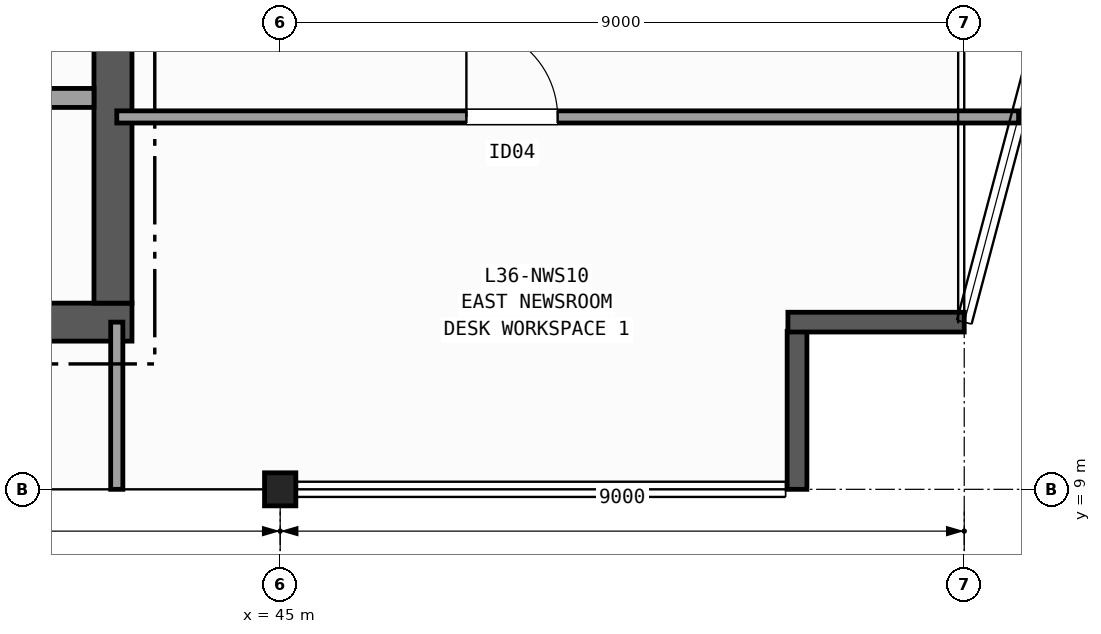
"""IFC4 building model, lengths in metres.
Left out: names, types, materials, properties, quantities, classifications, styles, units other than length and angle.
Written with IfcOpenShell. Run it as: python <this file> out.ifc"""

import sys

from ifc_helpers import new_model, si_unit, direction, frame, frame_2d, origin, origin_2d, place, context, subcontext, project, spatial, rectangle, i_section, extrude, element, fill, save


model = new_model("IFC4")
c1 = context("Model", 3, precision=1e-05, world=origin(), true_north=direction((0.0, 1.0)))
c2 = subcontext(c1, "Body", "Model", "MODEL_VIEW")
j1 = project(units=[si_unit("LENGTHUNIT", "METRE"), si_unit("PLANEANGLEUNIT", "RADIAN")], contexts=[c1])
p1 = place(None, origin())
s1 = spatial("IfcSite", under=j1, at=p1, CompositionType="ELEMENT")
p2 = place(p1, origin())
s2 = spatial("IfcBuilding", under=s1, at=p2, CompositionType="ELEMENT")
p3 = place(p2, frame((0.0, 0.0, 147.0)))
s3 = spatial("IfcBuildingStorey", under=s2, at=p3, CompositionType="ELEMENT", Elevation=147.0)
p4 = place(p3, frame((45.0, 9.0, 0.0), z_axis=(0.0, 0.0, 1.0), x_axis=(1.0, 0.0, 0.0)))
e1 = element("IfcColumn", 1, at=p4, inside=s3, PredefinedType="COLUMN", context=c2, shape_type="SweptSolid", body=[
    extrude(i_section(OverallWidth=0.412, OverallDepth=0.435, WebThickness=0.036, FlangeThickness=0.057, FilletRadius=0.015, at=origin_2d()), origin(), (0.0, 0.0, 1.0), 3.7),
])
p5 = place(p3, frame((51.8, 9.0, 0.0), z_axis=(0.0, 0.0, 1.0), x_axis=(0.0, 1.0, 0.0)))
e2 = element("IfcWall", 2, at=p5, inside=s3, PredefinedType="SOLIDWALL", context=c2, shape_type="SweptSolid", body=[
    extrude(rectangle(XDim=2.08, YDim=0.26, at=frame_2d((1.04, 0.0))), origin(), (0.0, 0.0, 1.0), 3.42),
])
p6 = place(p3, frame((51.68, 11.2, 0.0), z_axis=(0.0, 0.0, 1.0), x_axis=(1.0, 0.0, 0.0)))
e3 = element("IfcWall", 3, at=p6, inside=s3, PredefinedType="SOLIDWALL", context=c2, shape_type="SweptSolid", body=[
    extrude(rectangle(XDim=2.32, YDim=0.26, at=frame_2d((1.16, 0.0))), origin(), (0.0, 0.0, 1.0), 3.42),
])
p7 = place(p3, frame((29.15, 11.2, 0.0), z_axis=(0.0, 0.0, 1.0), x_axis=(1.0, 0.0, 0.0)))
e4 = element("IfcWall", 4, at=p7, inside=s3, PredefinedType="SHEAR", context=c2, shape_type="SweptSolid", body=[
    extrude(rectangle(XDim=13.9, YDim=0.5, at=frame_2d((6.95, 0.0))), origin(), (0.0, 0.0, 1.0), 3.42),
])
p8 = place(p3, frame((42.8, 11.45, 0.0), z_axis=(0.0, 0.0, 1.0), x_axis=(0.0, 1.0, 0.0)))
e5 = element("IfcWall", 5, at=p8, inside=s3, PredefinedType="SHEAR", context=c2, shape_type="SweptSolid", body=[
    extrude(rectangle(XDim=12.9, YDim=0.5, at=frame_2d((6.45, 0.0))), origin(), (0.0, 0.0, 1.0), 3.42),
])
p9 = place(p3, frame((38.2, 14.15, 0.0), z_axis=(0.0, 0.0, 1.0), x_axis=(1.0, 0.0, 0.0)))
e6 = element("IfcWall", 6, at=p9, inside=s3, PredefinedType="PARTITIONING", context=c2, shape_type="SweptSolid", body=[
    extrude(rectangle(XDim=4.35, YDim=0.25, at=frame_2d((2.175, 0.0))), origin(), (0.0, 0.0, 1.0), 3.42),
])
p10 = place(p9, frame((0.925, 0.0, 0.0)))
e7 = element("IfcOpeningElement", 7, at=p10, cuts=e6, PredefinedType="OPENING", context=c2, shape_type="SweptSolid", body=[
    extrude(rectangle(XDim=1.15, YDim=2.15, at=frame_2d((0.575, 1.075))), frame((0.0, 0.135, 0.0), z_axis=(0.0, -1.0, 0.0), x_axis=(1.0, 0.0, 0.0)), (0.0, 0.0, 1.0), 0.27),
])
p11 = place(p3, frame((42.85, 9.0, 0.0), z_axis=(0.0, 0.0, 1.0), x_axis=(0.0, 1.0, 0.0)))
e8 = element("IfcWall", 8, at=p11, inside=s3, PredefinedType="PARTITIONING", context=c2, shape_type="SweptSolid", body=[
    extrude(rectangle(XDim=2.2, YDim=0.16, at=frame_2d((1.1, 0.0))), origin(), (0.0, 0.0, 1.0), 2.634),
])
p12 = place(p3, frame((42.85, 13.9, 0.0), z_axis=(0.0, 0.0, 1.0), x_axis=(1.0, 0.0, 0.0)))
e9 = element("IfcWall", 9, at=p12, inside=s3, PredefinedType="PARTITIONING", context=c2, shape_type="SweptSolid", body=[
    extrude(rectangle(XDim=11.865, YDim=0.16, at=frame_2d((5.933, 0.0))), origin(), (0.0, 0.0, 1.0), 3.42),
])
p13 = place(p12, frame((4.6, 0.0, 0.0)))
e10 = element("IfcOpeningElement", 10, at=p13, cuts=e9, PredefinedType="OPENING", context=c2, shape_type="SweptSolid", body=[
    extrude(rectangle(XDim=1.2, YDim=2.15, at=frame_2d((0.6, 1.075))), frame((0.0, 0.09, 0.0), z_axis=(0.0, -1.0, 0.0), x_axis=(1.0, 0.0, 0.0)), (0.0, 0.0, 1.0), 0.18),
])
p14 = place(p13, origin())
e11 = element("IfcDoor", 11, at=p14, inside=s3, OperationType="SINGLE_SWING_LEFT", PredefinedType="DOOR", context=c2, shape_type="SweptSolid", body=[
    extrude(rectangle(XDim=1.2, YDim=2.15, at=frame_2d((0.6, 1.075))), frame((0.0, 0.025, 0.0), z_axis=(0.0, -1.0, 0.0), x_axis=(1.0, 0.0, 0.0)), (0.0, 0.0, 1.0), 0.05),
])
fill(e10, e11)
save(model, sys.argv[1])
